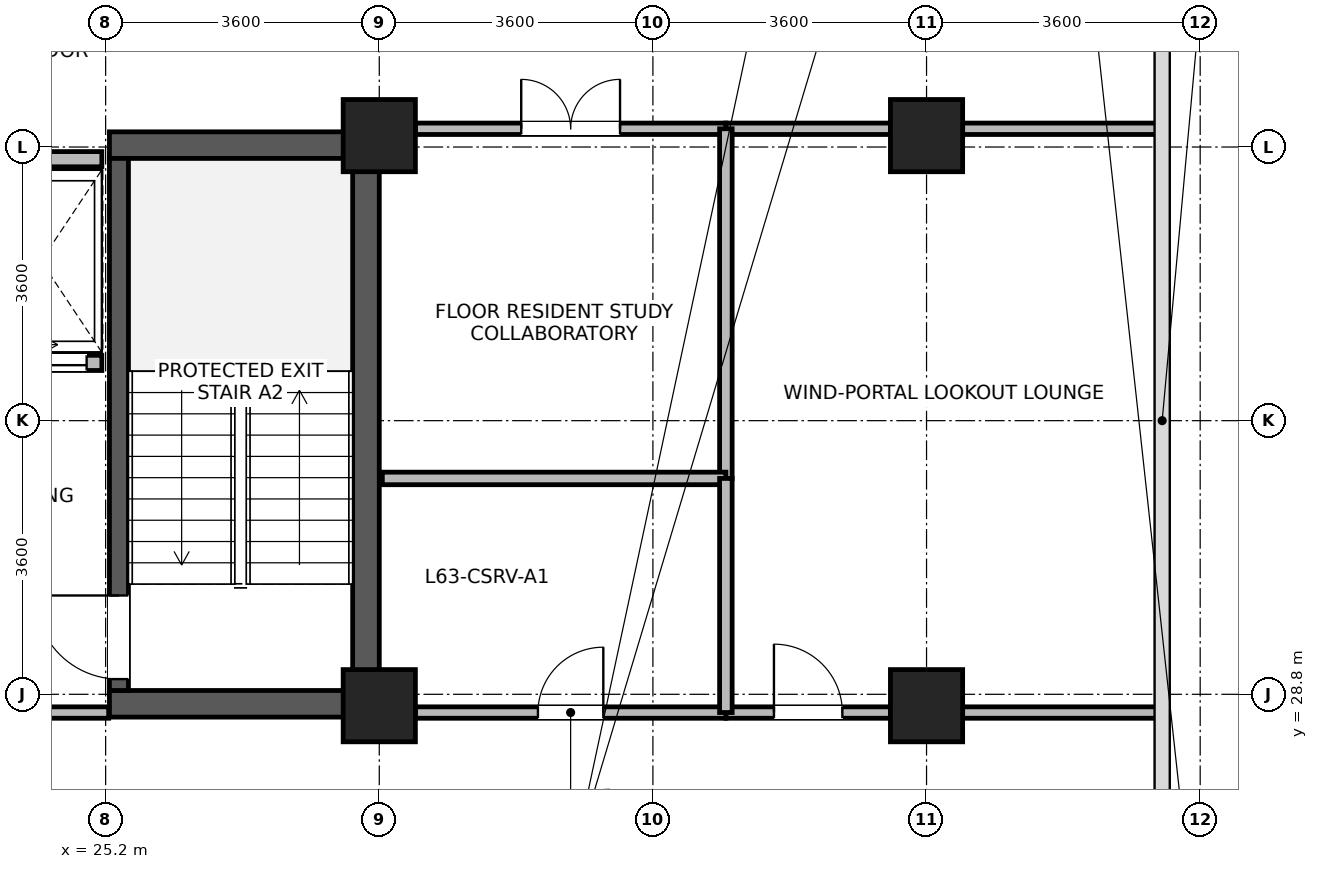
"""IFC4 building model, lengths in metres.
Left out: names, types, materials, properties, quantities, classifications, styles, units other than length and angle.
Written with IfcOpenShell. Run it as: python <this file> out.ifc"""

import sys

from ifc_helpers import new_model, si_unit, direction, frame, frame_2d, origin, origin_2d, place, context, subcontext, project, spatial, rectangle, extrude, source, transform, mapped, element, fill, save


model = new_model("IFC4")
c1 = context("Model", 3, precision=1e-05, world=origin(), true_north=direction((0.0, 1.0)))
c2 = subcontext(c1, "Body", "Model", "MODEL_VIEW")
j1 = project(units=[si_unit("LENGTHUNIT", "METRE"), si_unit("PLANEANGLEUNIT", "RADIAN")], contexts=[c1])
p1 = place(None, origin())
s1 = spatial("IfcSite", under=j1, at=p1, CompositionType="ELEMENT")
p2 = place(p1, origin())
s2 = spatial("IfcBuilding", under=s1, at=p2, CompositionType="ELEMENT")
p3 = place(p2, frame((0.0, 0.0, 246.2)))
s3 = spatial("IfcBuildingStorey", under=s2, at=p3, CompositionType="ELEMENT", Elevation=246.2)
p4 = place(p3, frame((28.625, 28.5, 0.0), z_axis=(0.0, 0.0, 1.0), x_axis=(0.0, 1.0, 0.0)))
e1 = element("IfcWall", 1, at=p4, inside=s3, PredefinedType="SHEAR", context=c2, shape_type="SweptSolid", body=[
    extrude(rectangle(XDim=7.7, YDim=0.35, at=frame_2d((3.85, 0.0))), origin(), (0.0, 0.0, 1.0), 3.28),
])
for number, where, z_axis, x_axis in (
    (2, (25.25, 28.675, 0.0), (0.0, 0.0, 1.0), (1.0, 0.0, 0.0)),
    (3, (25.25, 36.025, 0.0), (0.0, 0.0, 1.0), (1.0, 0.0, 0.0)),
):
    element("IfcWall", number, at=place(p3, frame(where, z_axis=z_axis, x_axis=x_axis)), inside=s3, PredefinedType="SHEAR", context=c2, shape_type="SweptSolid", body=[
        extrude(rectangle(XDim=3.2, YDim=0.35, at=frame_2d((1.6, 0.0))), origin(), (0.0, 0.0, 1.0), 3.28),
    ])
p5 = place(p3, frame((25.375, 28.85, 0.0), z_axis=(0.0, 0.0, 1.0), x_axis=(0.0, 1.0, 0.0)))
e4 = element("IfcWall", 4, at=p5, inside=s3, PredefinedType="SHEAR", context=c2, shape_type="SweptSolid", body=[
    extrude(rectangle(XDim=7.0, YDim=0.25, at=frame_2d((3.5, 0.0))), origin(), (0.0, 0.0, 1.0), 3.28),
])
p6 = place(p5, frame((0.15, 0.0, 0.0)))
e5 = element("IfcOpeningElement", 5, at=p6, cuts=e4, PredefinedType="OPENING", context=c2, shape_type="SweptSolid", body=[
    extrude(rectangle(XDim=1.1, YDim=2.08, at=frame_2d((0.55, 1.04))), frame((0.0, 0.135, 0.0), z_axis=(0.0, -1.0, 0.0), x_axis=(1.0, 0.0, 0.0)), (0.0, 0.0, 1.0), 0.27),
])
m1 = source(origin(), c2, "Body", "SweptSolid", [
    extrude(rectangle(XDim=0.95, YDim=0.95, at=origin_2d()), origin(), (0.0, 0.0, 1.0), 3.7),
])
for number, where, z_axis, x_axis in (
    (6, (28.8, 28.65, 0.0), (0.0, 0.0, 1.0), (1.0, 0.0, 0.0)),
    (7, (28.8, 36.15, 0.0), (0.0, 0.0, 1.0), (1.0, 0.0, 0.0)),
    (8, (36.0, 28.65, 0.0), (0.0, 0.0, 1.0), (1.0, 0.0, 0.0)),
    (9, (36.0, 36.15, 0.0), (0.0, 0.0, 1.0), (1.0, 0.0, 0.0)),
):
    element("IfcColumn", number, at=place(p3, frame(where, z_axis=z_axis, x_axis=x_axis)), inside=s3, PredefinedType="COLUMN", context=c2, shape_type="MappedRepresentation", body=[
        mapped(m1, transform((0.0, 0.0, 0.0), x_axis=(1.0, 0.0, 0.0), y_axis=(0.0, 1.0, 0.0), z_axis=(0.0, 0.0, 1.0), scale=1.0)),
    ])
p7 = place(p3, frame((23.55, 33.16, 0.0), z_axis=(0.0, 0.0, 1.0), x_axis=(1.0, 0.0, 0.0)))
e10 = element("IfcWall", 10, at=p7, inside=s3, PredefinedType="PARTITIONING", context=c2, shape_type="SweptSolid", body=[
    extrude(rectangle(XDim=1.6, YDim=0.2, at=frame_2d((0.8, 0.0))), origin(), (0.0, 0.0, 1.0), 3.26),
])
p8 = place(p7, frame((0.2, 0.0, 0.0)))
e11 = element("IfcOpeningElement", 11, at=p8, cuts=e10, PredefinedType="OPENING", context=c2, shape_type="SweptSolid", body=[
    extrude(rectangle(XDim=1.2, YDim=2.12, at=frame_2d((0.6, 1.06))), frame((0.0, 0.11, 0.0), z_axis=(0.0, -1.0, 0.0), x_axis=(1.0, 0.0, 0.0)), (0.0, 0.0, 1.0), 0.22),
])
p9 = place(p3, frame((23.55, 35.84, 0.0), z_axis=(0.0, 0.0, 1.0), x_axis=(1.0, 0.0, 0.0)))
e12 = element("IfcWall", 12, at=p9, inside=s3, PredefinedType="PARTITIONING", context=c2, shape_type="SweptSolid", body=[
    extrude(rectangle(XDim=1.6, YDim=0.2, at=frame_2d((0.8, 0.0))), origin(), (0.0, 0.0, 1.0), 2.36),
])
p10 = place(p3, frame((33.36, 28.56, 0.0), z_axis=(0.0, 0.0, 1.0), x_axis=(1.0, 0.0, 0.0)))
e13 = element("IfcWall", 13, at=p10, inside=s3, PredefinedType="PARTITIONING", context=c2, shape_type="SweptSolid", body=[
    extrude(rectangle(XDim=2.165, YDim=0.15, at=frame_2d((1.083, 0.0))), origin(), (0.0, 0.0, 1.0), 2.71),
])
p11 = place(p10, frame((0.633, 0.0, 0.0)))
e14 = element("IfcOpeningElement", 14, at=p11, cuts=e13, PredefinedType="OPENING", context=c2, shape_type="SweptSolid", body=[
    extrude(rectangle(XDim=0.9, YDim=2.08, at=frame_2d((0.45, 1.04))), frame((0.0, 0.085, 0.0), z_axis=(0.0, -1.0, 0.0), x_axis=(1.0, 0.0, 0.0)), (0.0, 0.0, 1.0), 0.17),
])
p12 = place(p3, frame((36.475, 28.56, 0.0), z_axis=(0.0, 0.0, 1.0), x_axis=(1.0, 0.0, 0.0)))
e15 = element("IfcWall", 15, at=p12, inside=s3, PredefinedType="PARTITIONING", context=c2, shape_type="SweptSolid", body=[
    extrude(rectangle(XDim=2.605, YDim=0.15, at=frame_2d((1.302, 0.0))), origin(), (0.0, 0.0, 1.0), 2.46),
])
p13 = place(p3, frame((33.36, 36.24, 0.0), z_axis=(0.0, 0.0, 1.0), x_axis=(1.0, 0.0, 0.0)))
e16 = element("IfcWall", 16, at=p13, inside=s3, PredefinedType="PARTITIONING", context=c2, shape_type="SweptSolid", body=[
    extrude(rectangle(XDim=2.165, YDim=0.15, at=frame_2d((1.083, 0.0))), origin(), (0.0, 0.0, 1.0), 2.71),
])
p14 = place(p3, frame((36.475, 36.24, 0.0), z_axis=(0.0, 0.0, 1.0), x_axis=(1.0, 0.0, 0.0)))
e17 = element("IfcWall", 17, at=p14, inside=s3, PredefinedType="PARTITIONING", context=c2, shape_type="SweptSolid", body=[
    extrude(rectangle(XDim=2.605, YDim=0.15, at=frame_2d((1.302, 0.0))), origin(), (0.0, 0.0, 1.0), 2.46),
])
p15 = place(p3, frame((29.275, 28.56, 0.0), z_axis=(0.0, 0.0, 1.0), x_axis=(1.0, 0.0, 0.0)))
e18 = element("IfcWall", 18, at=p15, inside=s3, PredefinedType="PARTITIONING", context=c2, shape_type="SweptSolid", body=[
    extrude(rectangle(XDim=4.085, YDim=0.15, at=frame_2d((2.042, 0.0))), origin(), (0.0, 0.0, 1.0), 2.71),
])
p16 = place(p15, frame((1.613, 0.0, 0.0)))
e19 = element("IfcOpeningElement", 19, at=p16, cuts=e18, PredefinedType="OPENING", context=c2, shape_type="SweptSolid", body=[
    extrude(rectangle(XDim=0.86, YDim=2.02, at=frame_2d((0.43, 1.01))), frame((0.0, 0.085, 0.0), z_axis=(0.0, -1.0, 0.0), x_axis=(1.0, 0.0, 0.0)), (0.0, 0.0, 1.0), 0.17),
])
p17 = place(p3, frame((29.275, 36.24, 0.0), z_axis=(0.0, 0.0, 1.0), x_axis=(1.0, 0.0, 0.0)))
e20 = element("IfcWall", 20, at=p17, inside=s3, PredefinedType="PARTITIONING", context=c2, shape_type="SweptSolid", body=[
    extrude(rectangle(XDim=4.085, YDim=0.15, at=frame_2d((2.042, 0.0))), origin(), (0.0, 0.0, 1.0), 2.71),
])
p18 = place(p17, frame((1.393, 0.0, 0.0)))
e21 = element("IfcOpeningElement", 21, at=p18, cuts=e20, PredefinedType="OPENING", context=c2, shape_type="SweptSolid", body=[
    extrude(rectangle(XDim=1.3, YDim=2.12, at=frame_2d((0.65, 1.06))), frame((0.0, 0.085, 0.0), z_axis=(0.0, -1.0, 0.0), x_axis=(1.0, 0.0, 0.0)), (0.0, 0.0, 1.0), 0.17),
])
p19 = place(p3, frame((33.36, 31.64, 0.0), z_axis=(0.0, 0.0, 1.0), x_axis=(0.0, 1.0, 0.0)))
e22 = element("IfcWall", 22, at=p19, inside=s3, PredefinedType="PARTITIONING", context=c2, shape_type="SweptSolid", body=[
    extrude(rectangle(XDim=4.6, YDim=0.165, at=frame_2d((2.3, 0.0))), origin(), (0.0, 0.0, 1.0), 3.26),
])
p20 = place(p3, frame((28.84, 31.64, 0.0), z_axis=(0.0, 0.0, 1.0), x_axis=(1.0, 0.0, 0.0)))
e23 = element("IfcWall", 23, at=p20, inside=s3, PredefinedType="PARTITIONING", context=c2, shape_type="SweptSolid", body=[
    extrude(rectangle(XDim=4.52, YDim=0.165, at=frame_2d((2.26, 0.0))), origin(), (0.0, 0.0, 1.0), 3.26),
])
p21 = place(p3, frame((21.76, 28.56, 0.0), z_axis=(0.0, 0.0, 1.0), x_axis=(1.0, 0.0, 0.0)))
e24 = element("IfcWall", 24, at=p21, inside=s3, PredefinedType="PARTITIONING", context=c2, shape_type="SweptSolid", body=[
    extrude(rectangle(XDim=3.48, YDim=0.15, at=frame_2d((1.74, 0.0))), origin(), (0.0, 0.0, 1.0), 2.36),
])
p22 = place(p21, frame((0.99, 0.0, 0.0)))
e25 = element("IfcOpeningElement", 25, at=p22, cuts=e24, PredefinedType="OPENING", context=c2, shape_type="SweptSolid", body=[
    extrude(rectangle(XDim=1.5, YDim=2.1, at=frame_2d((0.75, 1.05))), frame((0.0, 0.085, 0.0), z_axis=(0.0, -1.0, 0.0), x_axis=(1.0, 0.0, 0.0)), (0.0, 0.0, 1.0), 0.17),
])
p23 = place(p3, frame((33.36, 28.56, 0.0), z_axis=(0.0, 0.0, 1.0), x_axis=(0.0, 1.0, 0.0)))
e26 = element("IfcWall", 26, at=p23, inside=s3, PredefinedType="PARTITIONING", context=c2, shape_type="SweptSolid", body=[
    extrude(rectangle(XDim=3.08, YDim=0.165, at=frame_2d((1.54, 0.0))), origin(), (0.0, 0.0, 1.0), 3.26),
])
p24 = place(p6, origin())
e27 = element("IfcDoor", 27, at=p24, inside=s3, OperationType="SINGLE_SWING_RIGHT", PredefinedType="DOOR", context=c2, shape_type="SweptSolid", body=[
    extrude(rectangle(XDim=1.1, YDim=2.08, at=frame_2d((0.55, 1.04))), frame((0.0, 0.025, 0.0), z_axis=(0.0, -1.0, 0.0), x_axis=(1.0, 0.0, 0.0)), (0.0, 0.0, 1.0), 0.05),
])
fill(e5, e27)
p25 = place(p8, origin())
e28 = element("IfcDoor", 28, at=p25, inside=s3, OperationType="SLIDING_TO_RIGHT", PredefinedType="DOOR", context=c2, shape_type="SweptSolid", body=[
    extrude(rectangle(XDim=1.2, YDim=2.12, at=frame_2d((0.6, 1.06))), frame((0.0, 0.025, 0.0), z_axis=(0.0, -1.0, 0.0), x_axis=(1.0, 0.0, 0.0)), (0.0, 0.0, 1.0), 0.05),
])
fill(e11, e28)
p26 = place(p11, origin())
e29 = element("IfcDoor", 29, at=p26, inside=s3, OperationType="SINGLE_SWING_LEFT", PredefinedType="DOOR", context=c2, shape_type="SweptSolid", body=[
    extrude(rectangle(XDim=0.9, YDim=2.08, at=frame_2d((0.45, 1.04))), frame((0.0, 0.025, 0.0), z_axis=(0.0, -1.0, 0.0), x_axis=(1.0, 0.0, 0.0)), (0.0, 0.0, 1.0), 0.05),
])
fill(e14, e29)
p27 = place(p16, origin())
e30 = element("IfcDoor", 30, at=p27, inside=s3, OperationType="SINGLE_SWING_RIGHT", PredefinedType="DOOR", context=c2, shape_type="SweptSolid", body=[
    extrude(rectangle(XDim=0.86, YDim=2.02, at=frame_2d((0.43, 1.01))), frame((0.0, 0.025, 0.0), z_axis=(0.0, -1.0, 0.0), x_axis=(1.0, 0.0, 0.0)), (0.0, 0.0, 1.0), 0.05),
])
fill(e19, e30)
p28 = place(p18, origin())
e31 = element("IfcDoor", 31, at=p28, inside=s3, OperationType="DOUBLE_DOOR_SINGLE_SWING", PredefinedType="DOOR", context=c2, shape_type="SweptSolid", body=[
    extrude(rectangle(XDim=1.3, YDim=2.12, at=frame_2d((0.65, 1.06))), frame((0.0, 0.025, 0.0), z_axis=(0.0, -1.0, 0.0), x_axis=(1.0, 0.0, 0.0)), (0.0, 0.0, 1.0), 0.05),
])
fill(e21, e31)
save(model, sys.argv[1])
